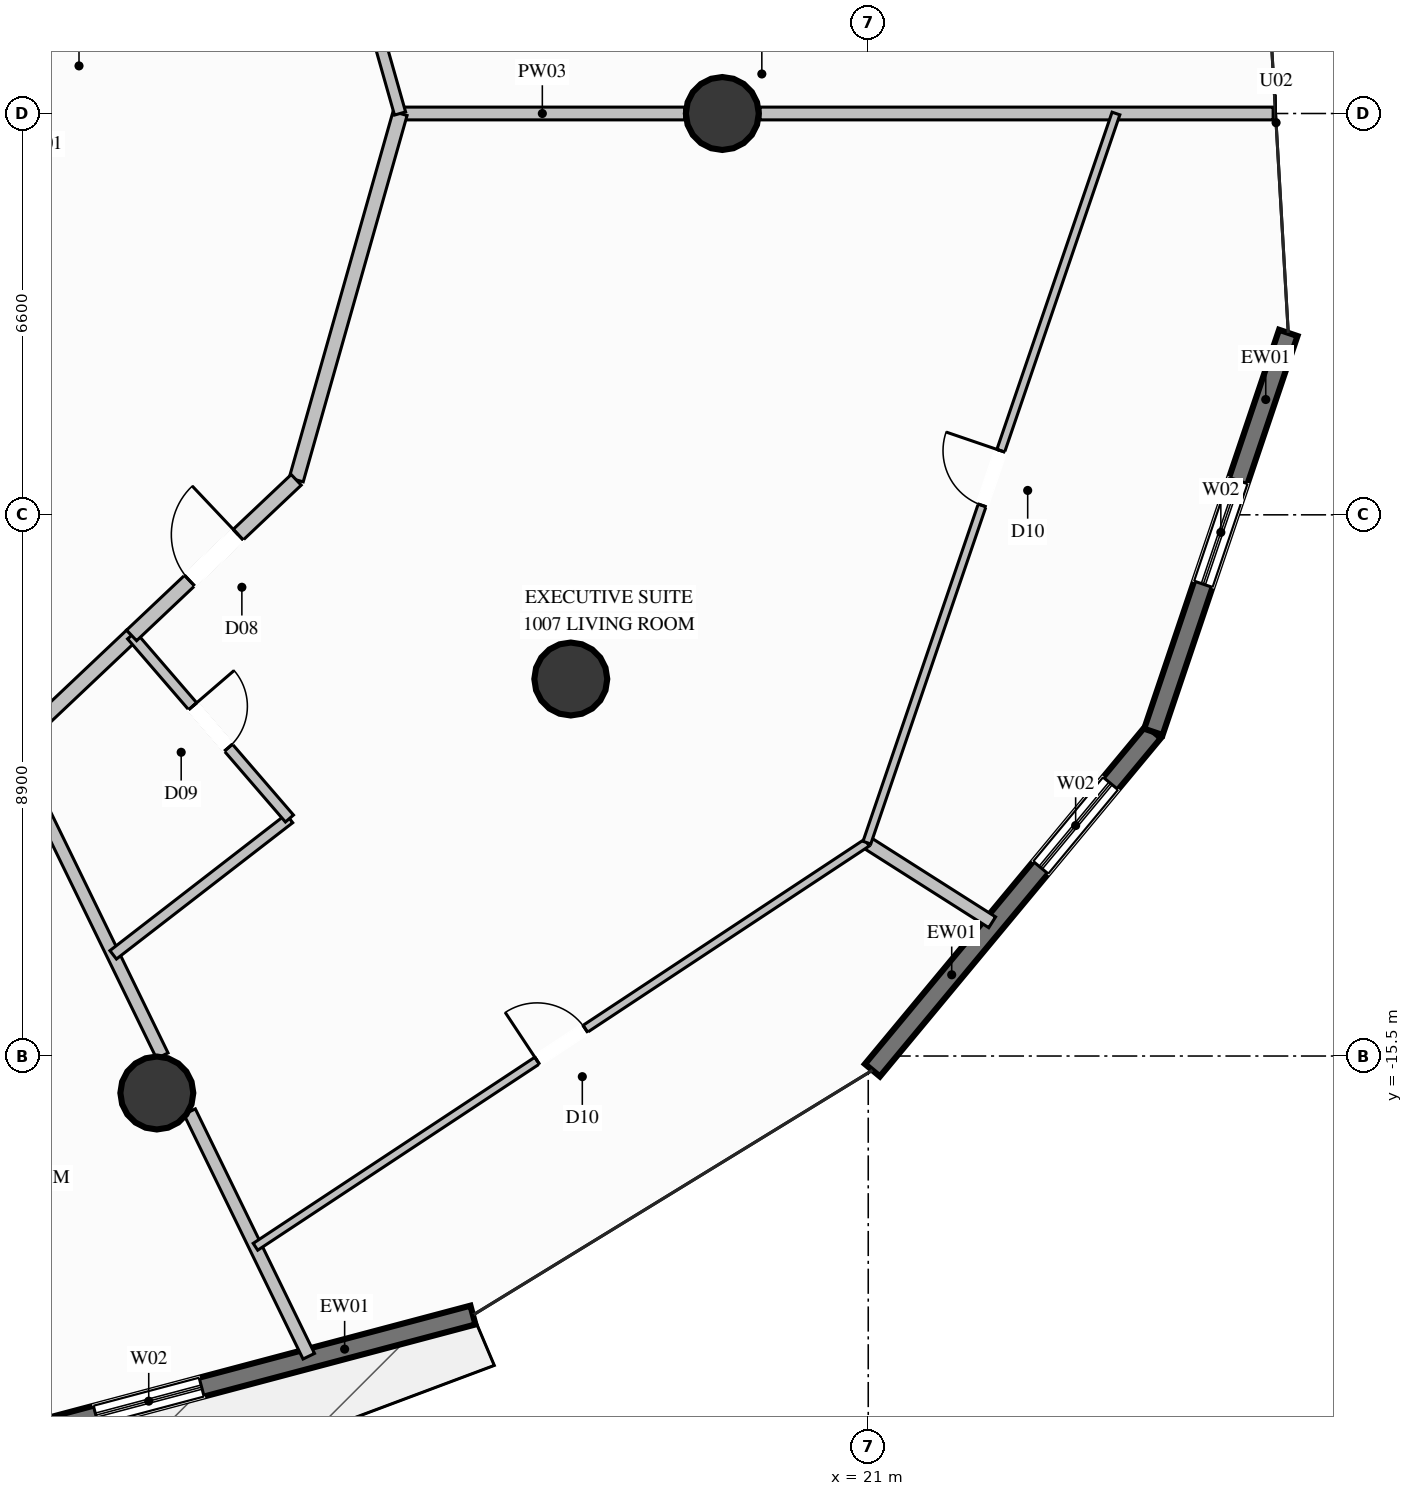
"""IFC4 building model, lengths in metres.
Left out: names, types, materials, properties, quantities, classifications, styles, units other than length and angle.
Written with IfcOpenShell. Run it as: python <this file> out.ifc"""

import sys

from ifc_helpers import new_model, si_unit, direction, frame, frame_2d, origin, origin_2d, place, context, subcontext, project, spatial, rectangle, circle, extrude, element, fill, save


model = new_model("IFC4")
c1 = context("Model", 3, precision=1e-05, world=origin(), true_north=direction((0.0, 1.0)))
c2 = subcontext(c1, "Body", "Model", "MODEL_VIEW")
j1 = project(units=[si_unit("LENGTHUNIT", "METRE"), si_unit("PLANEANGLEUNIT", "RADIAN")], contexts=[c1])
p1 = place(None, origin())
s1 = spatial("IfcSite", under=j1, at=p1, CompositionType="ELEMENT")
p2 = place(p1, origin())
s2 = spatial("IfcBuilding", under=s1, at=p2, CompositionType="ELEMENT")
p3 = place(p2, frame((0.0, 0.0, 39.2)))
s3 = spatial("IfcBuildingStorey", under=s2, at=p3, CompositionType="ELEMENT", Elevation=39.2)
for number, where, z_axis, x_axis in (
    (1, (18.6, 0.0, 0.0), (0.0, 0.0, 1.0), (1.0, 0.0, 0.0)),
    (2, (9.3, -16.108, 0.0), (0.0, 0.0, 1.0), (1.0, 0.0, 0.0)),
    (3, (16.108, -9.3, 0.0), (0.0, 0.0, 1.0), (1.0, 0.0, 0.0)),
):
    element("IfcColumn", number, at=place(p3, frame(where, z_axis=z_axis, x_axis=x_axis)), inside=s3, PredefinedType="COLUMN", context=c2, shape_type="SweptSolid", body=[
        extrude(circle(Radius=0.6, at=origin_2d()), origin(), (0.0, 0.0, 1.0), 3.6),
    ])
p4 = place(p3, frame((14.499, -19.76, 0.0), z_axis=(0.0, 0.0, 1.0), x_axis=(-0.966523209468, -0.256579199389, 0.0)))
e4 = element("IfcWall", 4, at=p4, inside=s3, PredefinedType="SOLIDWALL", context=c2, shape_type="SweptSolid", body=[
    extrude(rectangle(XDim=8.15, YDim=0.32, at=frame_2d((4.075, 0.0))), origin(), (0.0, 0.0, 1.0), 3.34),
])
p5 = place(p4, frame((4.617, 0.0, 0.35)))
e5 = element("IfcOpeningElement", 5, at=p5, cuts=e4, PredefinedType="OPENING", context=c2, shape_type="SweptSolid", body=[
    extrude(rectangle(XDim=1.8, YDim=2.6, at=frame_2d((0.9, 1.3))), frame((0.0, 0.17, 0.0), z_axis=(0.0, -1.0, 0.0), x_axis=(1.0, 0.0, 0.0)), (0.0, 0.0, 1.0), 0.34),
])
p6 = place(p3, frame((25.69, -10.169, 0.0), z_axis=(0.0, 0.0, 1.0), x_axis=(-0.638828887918, -0.769348849327, 0.0)))
e6 = element("IfcWall", 6, at=p6, inside=s3, PredefinedType="SOLIDWALL", context=c2, shape_type="SweptSolid", body=[
    extrude(rectangle(XDim=7.233, YDim=0.32, at=frame_2d((3.617, 0.0))), origin(), (0.0, 0.0, 1.0), 3.34),
])
p7 = place(p6, frame((1.102, 0.0, 0.35)))
e7 = element("IfcOpeningElement", 7, at=p7, cuts=e6, PredefinedType="OPENING", context=c2, shape_type="SweptSolid", body=[
    extrude(rectangle(XDim=1.8, YDim=2.6, at=frame_2d((0.9, 1.3))), frame((0.0, 0.17, 0.0), z_axis=(0.0, -1.0, 0.0), x_axis=(1.0, 0.0, 0.0)), (0.0, 0.0, 1.0), 0.34),
])
p8 = place(p3, frame((27.908, -3.608, 0.0), z_axis=(0.0, 0.0, 1.0), x_axis=(-0.320254087544, -0.947331683948, 0.0)))
e8 = element("IfcWall", 8, at=p8, inside=s3, PredefinedType="SOLIDWALL", context=c2, shape_type="SweptSolid", body=[
    extrude(rectangle(XDim=6.926, YDim=0.32, at=frame_2d((3.463, 0.0))), origin(), (0.0, 0.0, 1.0), 3.34),
])
p9 = place(p8, frame((2.563, 0.0, 0.35)))
e9 = element("IfcOpeningElement", 9, at=p9, cuts=e8, PredefinedType="OPENING", context=c2, shape_type="SweptSolid", body=[
    extrude(rectangle(XDim=1.8, YDim=2.6, at=frame_2d((0.9, 1.3))), frame((0.0, 0.17, 0.0), z_axis=(0.0, -1.0, 0.0), x_axis=(1.0, 0.0, 0.0)), (0.0, 0.0, 1.0), 0.34),
])
p10 = place(p3, frame((13.3, 0.0, 0.0), z_axis=(0.0, 0.0, 1.0), x_axis=(1.0, 0.0, 0.0)))
e10 = element("IfcWall", 10, at=p10, inside=s3, PredefinedType="PARTITIONING", context=c2, shape_type="SweptSolid", body=[
    extrude(rectangle(XDim=4.68, YDim=0.21, at=frame_2d((2.34, 0.0))), origin(), (0.0, 0.0, 1.0), 2.709),
])
p11 = place(p3, frame((19.22, 0.0, 0.0), z_axis=(0.0, 0.0, 1.0), x_axis=(1.0, 0.0, 0.0)))
e11 = element("IfcWall", 11, at=p11, inside=s3, PredefinedType="PARTITIONING", context=c2, shape_type="SweptSolid", body=[
    extrude(rectangle(XDim=8.439, YDim=0.21, at=frame_2d((4.219, 0.0))), origin(), (0.0, 0.0, 1.0), 3.34),
])
p12 = place(p3, frame((6.925, -10.436, 0.0), z_axis=(0.0, 0.0, 1.0), x_axis=(0.437992797289, -0.898978481123, 0.0)))
e12 = element("IfcWall", 12, at=p12, inside=s3, PredefinedType="PARTITIONING", context=c2, shape_type="SweptSolid", body=[
    extrude(rectangle(XDim=5.628, YDim=0.21, at=frame_2d((2.814, 0.0))), origin(), (0.0, 0.0, 1.0), 2.709),
])
p13 = place(p3, frame((9.839, -16.415, 0.0), z_axis=(0.0, 0.0, 1.0), x_axis=(0.438066667733, -0.898942486826, 0.0)))
e13 = element("IfcWall", 13, at=p13, inside=s3, PredefinedType="PARTITIONING", context=c2, shape_type="SweptSolid", body=[
    extrude(rectangle(XDim=4.474, YDim=0.21, at=frame_2d((2.237, 0.0))), origin(), (0.0, 0.0, 1.0), 3.34),
])
p14 = place(p3, frame((6.925, -10.436, 0.0), z_axis=(0.0, 0.0, 1.0), x_axis=(0.726651583854, 0.687006168591, 0.0)))
e14 = element("IfcWall", 14, at=p14, inside=s3, PredefinedType="PARTITIONING", context=c2, shape_type="SweptSolid", body=[
    extrude(rectangle(XDim=2.697, YDim=0.24, at=frame_2d((1.349, 0.0))), origin(), (0.0, 0.0, 1.0), 3.34),
])
p15 = place(p3, frame((8.582, -13.836, 0.0), z_axis=(0.0, 0.0, 1.0), x_axis=(0.791038798836, 0.611765983638, 0.0)))
e15 = element("IfcWall", 15, at=p15, inside=s3, PredefinedType="PLUMBINGWALL", context=c2, shape_type="SweptSolid", body=[
    extrude(rectangle(XDim=3.665, YDim=0.175, at=frame_2d((1.833, 0.0))), origin(), (0.0, 0.0, 1.0), 3.34),
])
p16 = place(p3, frame((8.885, -8.583, 0.0), z_axis=(0.0, 0.0, 1.0), x_axis=(0.652978495016, -0.757376448701, 0.0)))
e16 = element("IfcWall", 16, at=p16, inside=s3, PredefinedType="PLUMBINGWALL", context=c2, shape_type="SweptSolid", body=[
    extrude(rectangle(XDim=3.976, YDim=0.175, at=frame_2d((1.988, 0.0))), origin(), (0.0, 0.0, 1.0), 3.34),
])
p17 = place(p16, frame((1.538, 0.0, 0.0)))
e17 = element("IfcOpeningElement", 17, at=p17, cuts=e16, PredefinedType="OPENING", context=c2, shape_type="SweptSolid", body=[
    extrude(rectangle(XDim=0.9, YDim=2.1, at=frame_2d((0.45, 1.05))), frame((0.0, 0.098, 0.0), z_axis=(0.0, -1.0, 0.0), x_axis=(1.0, 0.0, 0.0)), (0.0, 0.0, 1.0), 0.195),
])
p18 = place(p3, frame((20.978, -11.991, 0.0), z_axis=(0.0, 0.0, 1.0), x_axis=(0.843826159016, -0.536616635374, 0.0)))
e18 = element("IfcWall", 18, at=p18, inside=s3, PredefinedType="PARTITIONING", context=c2, shape_type="SweptSolid", body=[
    extrude(rectangle(XDim=2.441, YDim=0.21, at=frame_2d((1.221, 0.0))), origin(), (0.0, 0.0, 1.0), 3.34),
])
p19 = place(p3, frame((11.592, -6.025, 0.0), z_axis=(0.0, 0.0, 1.0), x_axis=(0.272743314702, 0.962086838225, 0.0)))
e19 = element("IfcWall", 19, at=p19, inside=s3, PredefinedType="PARTITIONING", context=c2, shape_type="SweptSolid", body=[
    extrude(rectangle(XDim=6.262, YDim=0.24, at=frame_2d((3.131, 0.0))), origin(), (0.0, 0.0, 1.0), 3.34),
])
p20 = place(p3, frame((8.885, -8.583, 0.0), z_axis=(0.0, 0.0, 1.0), x_axis=(0.726816794063, 0.686831382413, 0.0)))
e20 = element("IfcWall", 20, at=p20, inside=s3, PredefinedType="PARTITIONING", context=c2, shape_type="SweptSolid", body=[
    extrude(rectangle(XDim=3.725, YDim=0.24, at=frame_2d((1.862, 0.0))), origin(), (0.0, 0.0, 1.0), 3.34),
])
p21 = place(p20, frame((1.312, 0.0, 0.0)))
e21 = element("IfcOpeningElement", 21, at=p21, cuts=e20, PredefinedType="OPENING", context=c2, shape_type="SweptSolid", body=[
    extrude(rectangle(XDim=1.1, YDim=2.3, at=frame_2d((0.55, 1.15))), frame((0.0, 0.13, 0.0), z_axis=(0.0, -1.0, 0.0), x_axis=(1.0, 0.0, 0.0)), (0.0, 0.0, 1.0), 0.26),
])
p22 = place(p3, frame((10.922, -18.637, 0.0), z_axis=(0.0, 0.0, 1.0), x_axis=(0.834262284768, 0.551367790331, 0.0)))
e22 = element("IfcWall", 22, at=p22, inside=s3, PredefinedType="PARTITIONING", context=c2, shape_type="SweptSolid", body=[
    extrude(rectangle(XDim=12.054, YDim=0.135, at=frame_2d((6.027, 0.0))), origin(), (0.0, 0.0, 1.0), 3.34),
])
p23 = place(p22, frame((5.552, 0.0, 0.0)))
e23 = element("IfcOpeningElement", 23, at=p23, cuts=e22, PredefinedType="OPENING", context=c2, shape_type="SweptSolid", body=[
    extrude(rectangle(XDim=0.95, YDim=2.1, at=frame_2d((0.475, 1.05))), frame((0.0, 0.078, 0.0), z_axis=(0.0, -1.0, 0.0), x_axis=(1.0, 0.0, 0.0)), (0.0, 0.0, 1.0), 0.155),
])
p24 = place(p3, frame((20.978, -11.991, 0.0), z_axis=(0.0, 0.0, 1.0), x_axis=(0.323247804531, 0.946314354148, 0.0)))
e24 = element("IfcWall", 24, at=p24, inside=s3, PredefinedType="PARTITIONING", context=c2, shape_type="SweptSolid", body=[
    extrude(rectangle(XDim=12.671, YDim=0.135, at=frame_2d((6.335, 0.0))), origin(), (0.0, 0.0, 1.0), 3.34),
])
p25 = place(p24, frame((5.861, 0.0, 0.0)))
e25 = element("IfcOpeningElement", 25, at=p25, cuts=e24, PredefinedType="OPENING", context=c2, shape_type="SweptSolid", body=[
    extrude(rectangle(XDim=0.95, YDim=2.1, at=frame_2d((0.475, 1.05))), frame((0.0, 0.078, 0.0), z_axis=(0.0, -1.0, 0.0), x_axis=(1.0, 0.0, 0.0)), (0.0, 0.0, 1.0), 0.155),
])
p26 = place(p3, frame((13.3, 0.0, 0.0), z_axis=(0.0, 0.0, 1.0), x_axis=(-0.272743314702, 0.962086838225, 0.0)))
e26 = element("IfcWall", 26, at=p26, inside=s3, PredefinedType="PARTITIONING", context=c2, shape_type="SweptSolid", body=[
    extrude(rectangle(XDim=6.262, YDim=0.19, at=frame_2d((3.131, 0.0))), origin(), (0.0, 0.0, 1.0), 3.34),
])
p27 = place(p26, frame((2.656, 0.0, 0.0)))
e27 = element("IfcOpeningElement", 27, at=p27, cuts=e26, PredefinedType="OPENING", context=c2, shape_type="SweptSolid", body=[
    extrude(rectangle(XDim=0.95, YDim=2.1, at=frame_2d((0.475, 1.05))), frame((0.0, 0.105, 0.0), z_axis=(0.0, -1.0, 0.0), x_axis=(1.0, 0.0, 0.0)), (0.0, 0.0, 1.0), 0.21),
])
p28 = place(p5, origin())
e28 = element("IfcWindow", 28, at=p28, inside=s3, PartitioningType="SINGLE_PANEL", PredefinedType="WINDOW", context=c2, shape_type="SweptSolid", body=[
    extrude(rectangle(XDim=1.8, YDim=2.6, at=frame_2d((0.9, 1.3))), frame((0.0, 0.03, 0.0), z_axis=(0.0, -1.0, 0.0), x_axis=(1.0, 0.0, 0.0)), (0.0, 0.0, 1.0), 0.06),
])
fill(e5, e28)
p29 = place(p7, origin())
e29 = element("IfcWindow", 29, at=p29, inside=s3, PartitioningType="SINGLE_PANEL", PredefinedType="WINDOW", context=c2, shape_type="SweptSolid", body=[
    extrude(rectangle(XDim=1.8, YDim=2.6, at=frame_2d((0.9, 1.3))), frame((0.0, 0.03, 0.0), z_axis=(0.0, -1.0, 0.0), x_axis=(1.0, 0.0, 0.0)), (0.0, 0.0, 1.0), 0.06),
])
fill(e7, e29)
p30 = place(p9, origin())
e30 = element("IfcWindow", 30, at=p30, inside=s3, PartitioningType="SINGLE_PANEL", PredefinedType="WINDOW", context=c2, shape_type="SweptSolid", body=[
    extrude(rectangle(XDim=1.8, YDim=2.6, at=frame_2d((0.9, 1.3))), frame((0.0, 0.03, 0.0), z_axis=(0.0, -1.0, 0.0), x_axis=(1.0, 0.0, 0.0)), (0.0, 0.0, 1.0), 0.06),
])
fill(e9, e30)
p31 = place(p17, origin())
e31 = element("IfcDoor", 31, at=p31, inside=s3, OperationType="SINGLE_SWING_LEFT", PredefinedType="DOOR", context=c2, shape_type="SweptSolid", body=[
    extrude(rectangle(XDim=0.9, YDim=2.1, at=frame_2d((0.45, 1.05))), frame((0.0, 0.025, 0.0), z_axis=(0.0, -1.0, 0.0), x_axis=(1.0, 0.0, 0.0)), (0.0, 0.0, 1.0), 0.05),
])
fill(e17, e31)
p32 = place(p21, origin())
e32 = element("IfcDoor", 32, at=p32, inside=s3, OperationType="SINGLE_SWING_RIGHT", PredefinedType="DOOR", context=c2, shape_type="SweptSolid", body=[
    extrude(rectangle(XDim=1.1, YDim=2.3, at=frame_2d((0.55, 1.15))), frame((0.0, 0.025, 0.0), z_axis=(0.0, -1.0, 0.0), x_axis=(1.0, 0.0, 0.0)), (0.0, 0.0, 1.0), 0.05),
])
fill(e21, e32)
p33 = place(p23, origin())
e33 = element("IfcDoor", 33, at=p33, inside=s3, OperationType="SINGLE_SWING_LEFT", PredefinedType="DOOR", context=c2, shape_type="SweptSolid", body=[
    extrude(rectangle(XDim=0.95, YDim=2.1, at=frame_2d((0.475, 1.05))), frame((0.0, 0.025, 0.0), z_axis=(0.0, -1.0, 0.0), x_axis=(1.0, 0.0, 0.0)), (0.0, 0.0, 1.0), 0.05),
])
fill(e23, e33)
p34 = place(p25, origin())
e34 = element("IfcDoor", 34, at=p34, inside=s3, OperationType="SINGLE_SWING_RIGHT", PredefinedType="DOOR", context=c2, shape_type="SweptSolid", body=[
    extrude(rectangle(XDim=0.95, YDim=2.1, at=frame_2d((0.475, 1.05))), frame((0.0, 0.025, 0.0), z_axis=(0.0, -1.0, 0.0), x_axis=(1.0, 0.0, 0.0)), (0.0, 0.0, 1.0), 0.05),
])
fill(e25, e34)
save(model, sys.argv[1])
